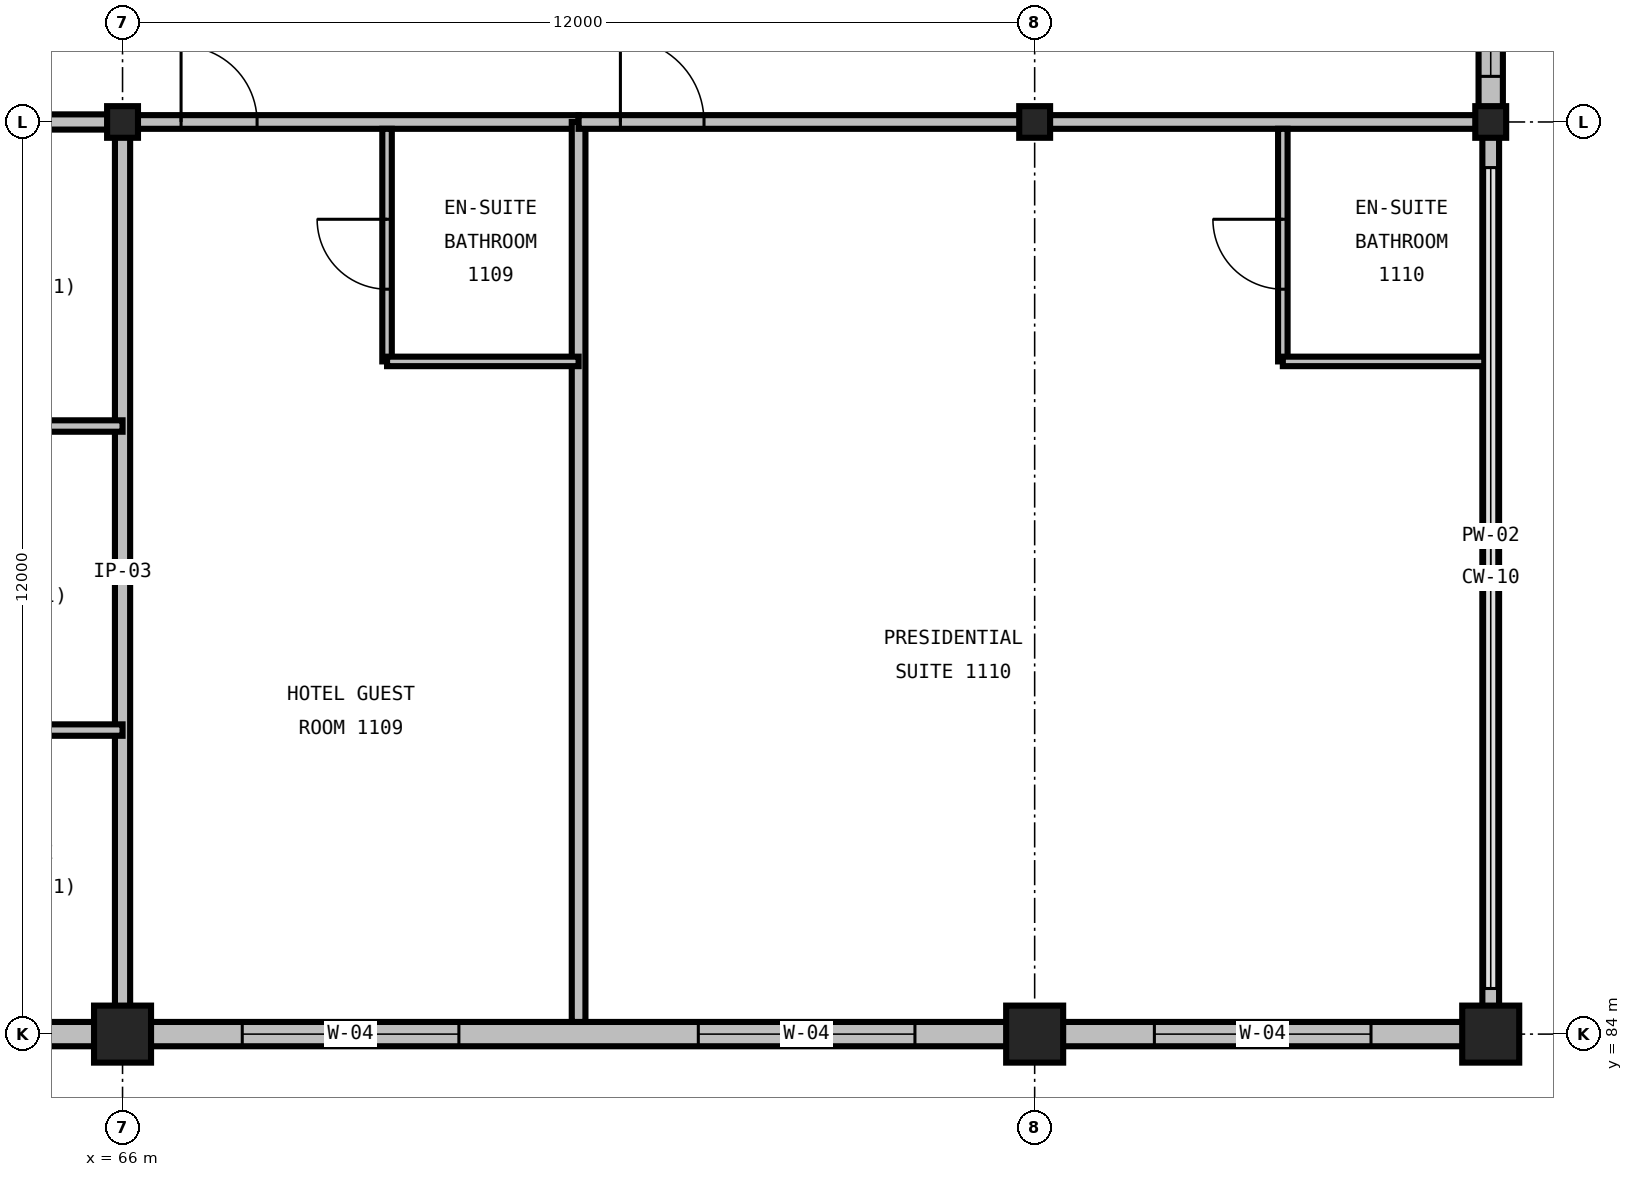
"""IFC4 building model, lengths in metres.
Left out: names, types, materials, properties, quantities, classifications, styles, units other than length and angle.
Written with IfcOpenShell. Run it as: python <this file> out.ifc"""

import sys

from ifc_helpers import new_model, si_unit, direction, frame, frame_2d, origin, origin_2d, place, context, subcontext, project, spatial, rectangle, i_section, extrude, element, fill, save


model = new_model("IFC4")
c1 = context("Model", 3, precision=1e-05, world=origin(), true_north=direction((0.0, 1.0)))
c2 = subcontext(c1, "Body", "Model", "MODEL_VIEW")
j1 = project(units=[si_unit("LENGTHUNIT", "METRE"), si_unit("PLANEANGLEUNIT", "RADIAN")], contexts=[c1])
p1 = place(None, origin())
s1 = spatial("IfcSite", under=j1, at=p1, CompositionType="ELEMENT")
p2 = place(p1, origin())
s2 = spatial("IfcBuilding", under=s1, at=p2, CompositionType="ELEMENT")
p3 = place(p2, frame((0.0, 0.0, 49.2)))
s3 = spatial("IfcBuildingStorey", under=s2, at=p3, CompositionType="ELEMENT", Elevation=49.2)
p4 = place(p3, frame((66.0, 84.0, 0.0), z_axis=(0.0, 0.0, 1.0), x_axis=(1.0, 0.0, 0.0)))
e1 = element("IfcColumn", 1, at=p4, inside=s3, PredefinedType="COLUMN", context=c2, shape_type="SweptSolid", body=[
    extrude(rectangle(XDim=0.75, YDim=0.75, at=origin_2d()), origin(), (0.0, 0.0, 1.0), 3.6),
])
p5 = place(p3, frame((66.0, 96.0, 0.0), z_axis=(0.0, 0.0, 1.0), x_axis=(1.0, 0.0, 0.0)))
e2 = element("IfcColumn", 2, at=p5, inside=s3, PredefinedType="COLUMN", context=c2, shape_type="SweptSolid", body=[
    extrude(i_section(OverallWidth=0.406, OverallDepth=0.416, WebThickness=0.03, FlangeThickness=0.048, FilletRadius=0.031, at=origin_2d()), origin(), (0.0, 0.0, 1.0), 3.6),
])
p6 = place(p3, frame((78.0, 84.0, 0.0), z_axis=(0.0, 0.0, 1.0), x_axis=(1.0, 0.0, 0.0)))
e3 = element("IfcColumn", 3, at=p6, inside=s3, PredefinedType="COLUMN", context=c2, shape_type="SweptSolid", body=[
    extrude(rectangle(XDim=0.75, YDim=0.75, at=origin_2d()), origin(), (0.0, 0.0, 1.0), 3.6),
])
p7 = place(p3, frame((78.0, 96.0, 0.0), z_axis=(0.0, 0.0, 1.0), x_axis=(1.0, 0.0, 0.0)))
e4 = element("IfcColumn", 4, at=p7, inside=s3, PredefinedType="COLUMN", context=c2, shape_type="SweptSolid", body=[
    extrude(i_section(OverallWidth=0.406, OverallDepth=0.416, WebThickness=0.03, FlangeThickness=0.048, FilletRadius=0.031, at=origin_2d()), origin(), (0.0, 0.0, 1.0), 3.6),
])
p8 = place(p3, frame((84.0, 84.0, 0.0), z_axis=(0.0, 0.0, 1.0), x_axis=(1.0, 0.0, 0.0)))
e5 = element("IfcColumn", 5, at=p8, inside=s3, PredefinedType="COLUMN", context=c2, shape_type="SweptSolid", body=[
    extrude(rectangle(XDim=0.75, YDim=0.75, at=origin_2d()), origin(), (0.0, 0.0, 1.0), 3.6),
])
p9 = place(p3, frame((84.0, 96.0, 0.0), z_axis=(0.0, 0.0, 1.0), x_axis=(1.0, 0.0, 0.0)))
e6 = element("IfcColumn", 6, at=p9, inside=s3, PredefinedType="COLUMN", context=c2, shape_type="SweptSolid", body=[
    extrude(i_section(OverallWidth=0.406, OverallDepth=0.416, WebThickness=0.03, FlangeThickness=0.048, FilletRadius=0.031, at=origin_2d()), origin(), (0.0, 0.0, 1.0), 3.6),
])
p10 = place(p3, frame((54.0, 84.0, 0.0), z_axis=(0.0, 0.0, 1.0), x_axis=(1.0, 0.0, 0.0)))
e7 = element("IfcWall", 7, at=p10, inside=s3, PredefinedType="STANDARD", context=c2, shape_type="SweptSolid", body=[
    extrude(rectangle(XDim=12.0, YDim=0.32, at=frame_2d((6.0, 0.0))), origin(), (0.0, 0.0, 1.0), 2.536),
])
p11 = place(p10, frame((2.3, 0.0, 1.0)))
e8 = element("IfcOpeningElement", 8, at=p11, cuts=e7, PredefinedType="OPENING", context=c2, shape_type="SweptSolid", body=[
    extrude(rectangle(XDim=1.4, YDim=1.4, at=frame_2d((0.7, 0.7))), frame((0.0, 0.175, 0.0), z_axis=(0.0, -1.0, 0.0), x_axis=(1.0, 0.0, 0.0)), (0.0, 0.0, 1.0), 0.35),
])
p12 = place(p10, frame((8.25, 0.0, 1.0)))
e9 = element("IfcOpeningElement", 9, at=p12, cuts=e7, PredefinedType="OPENING", context=c2, shape_type="SweptSolid", body=[
    extrude(rectangle(XDim=1.5, YDim=1.35, at=frame_2d((0.75, 0.675))), frame((0.0, 0.175, 0.0), z_axis=(0.0, -1.0, 0.0), x_axis=(1.0, 0.0, 0.0)), (0.0, 0.0, 1.0), 0.35),
])
p13 = place(p3, frame((66.0, 84.0, 0.0), z_axis=(0.0, 0.0, 1.0), x_axis=(1.0, 0.0, 0.0)))
e10 = element("IfcWall", 10, at=p13, inside=s3, PredefinedType="STANDARD", context=c2, shape_type="SweptSolid", body=[
    extrude(rectangle(XDim=12.0, YDim=0.32, at=frame_2d((6.0, 0.0))), origin(), (0.0, 0.0, 1.0), 2.536),
])
p14 = place(p13, frame((1.575, 0.0, 0.7)))
e11 = element("IfcOpeningElement", 11, at=p14, cuts=e10, PredefinedType="OPENING", context=c2, shape_type="SweptSolid", body=[
    extrude(rectangle(XDim=2.85, YDim=1.65, at=frame_2d((1.425, 0.825))), frame((0.0, 0.175, 0.0), z_axis=(0.0, -1.0, 0.0), x_axis=(1.0, 0.0, 0.0)), (0.0, 0.0, 1.0), 0.35),
])
p15 = place(p13, frame((7.575, 0.0, 0.7)))
e12 = element("IfcOpeningElement", 12, at=p15, cuts=e10, PredefinedType="OPENING", context=c2, shape_type="SweptSolid", body=[
    extrude(rectangle(XDim=2.85, YDim=1.65, at=frame_2d((1.425, 0.825))), frame((0.0, 0.175, 0.0), z_axis=(0.0, -1.0, 0.0), x_axis=(1.0, 0.0, 0.0)), (0.0, 0.0, 1.0), 0.35),
])
p16 = place(p3, frame((78.0, 84.0, 0.0), z_axis=(0.0, 0.0, 1.0), x_axis=(1.0, 0.0, 0.0)))
e13 = element("IfcWall", 13, at=p16, inside=s3, PredefinedType="STANDARD", context=c2, shape_type="SweptSolid", body=[
    extrude(rectangle(XDim=6.0, YDim=0.32, at=frame_2d((3.0, 0.0))), origin(), (0.0, 0.0, 1.0), 2.536),
])
p17 = place(p16, frame((1.575, 0.0, 0.7)))
e14 = element("IfcOpeningElement", 14, at=p17, cuts=e13, PredefinedType="OPENING", context=c2, shape_type="SweptSolid", body=[
    extrude(rectangle(XDim=2.85, YDim=1.65, at=frame_2d((1.425, 0.825))), frame((0.0, 0.175, 0.0), z_axis=(0.0, -1.0, 0.0), x_axis=(1.0, 0.0, 0.0)), (0.0, 0.0, 1.0), 0.35),
])
p18 = place(p3, frame((84.0, 84.0, 0.0), z_axis=(0.0, 0.0, 1.0), x_axis=(0.0, 1.0, 0.0)))
e15 = element("IfcWall", 15, at=p18, inside=s3, PredefinedType="PARAPET", context=c2, shape_type="SweptSolid", body=[
    extrude(rectangle(XDim=12.0, YDim=0.22, at=frame_2d((6.0, 0.0))), origin(), (0.0, 0.0, 1.0), 0.2),
])
p19 = place(p3, frame((84.0, 96.0, 0.0), z_axis=(0.0, 0.0, 1.0), x_axis=(0.0, 1.0, 0.0)))
e16 = element("IfcWall", 16, at=p19, inside=s3, PredefinedType="STANDARD", context=c2, shape_type="SweptSolid", body=[
    extrude(rectangle(XDim=9.0, YDim=0.32, at=frame_2d((4.5, 0.0))), origin(), (0.0, 0.0, 1.0), 2.981),
])
p20 = place(p19, frame((0.6, 0.0, 0.85)))
e17 = element("IfcOpeningElement", 17, at=p20, cuts=e16, PredefinedType="OPENING", context=c2, shape_type="SweptSolid", body=[
    extrude(rectangle(XDim=1.8, YDim=1.5, at=frame_2d((0.9, 0.75))), frame((0.0, 0.175, 0.0), z_axis=(0.0, -1.0, 0.0), x_axis=(1.0, 0.0, 0.0)), (0.0, 0.0, 1.0), 0.35),
])
p21 = place(p3, frame((66.0, 84.16, 0.0), z_axis=(0.0, 0.0, 1.0), x_axis=(0.0, 1.0, 0.0)))
e18 = element("IfcWall", 18, at=p21, inside=s3, PredefinedType="PARTITIONING", context=c2, shape_type="SweptSolid", body=[
    extrude(rectangle(XDim=11.84, YDim=0.2, at=frame_2d((5.92, 0.0))), origin(), (0.0, 0.0, 1.0), 2.59),
])
p22 = place(p3, frame((60.8, 96.0, 0.0), z_axis=(0.0, 0.0, 1.0), x_axis=(1.0, 0.0, 0.0)))
e19 = element("IfcWall", 19, at=p22, inside=s3, PredefinedType="PARTITIONING", context=c2, shape_type="SweptSolid", body=[
    extrude(rectangle(XDim=5.2, YDim=0.2, at=frame_2d((2.6, 0.0))), origin(), (0.0, 0.0, 1.0), 2.359),
])
for number, where, z_axis, x_axis in (
    (20, (60.8, 88.0, 0.0), (0.0, 0.0, 1.0), (1.0, 0.0, 0.0)),
    (21, (60.8, 92.0, 0.0), (0.0, 0.0, 1.0), (1.0, 0.0, 0.0)),
):
    element("IfcWall", number, at=place(p3, frame(where, z_axis=z_axis, x_axis=x_axis)), inside=s3, PredefinedType="PARTITIONING", context=c2, shape_type="SweptSolid", body=[
        extrude(rectangle(XDim=5.2, YDim=0.15, at=frame_2d((2.6, 0.0))), origin(), (0.0, 0.0, 1.0), 3.29),
    ])
p23 = place(p3, frame((66.0, 96.0, 0.0), z_axis=(0.0, 0.0, 1.0), x_axis=(1.0, 0.0, 0.0)))
e22 = element("IfcWall", 22, at=p23, inside=s3, PredefinedType="PARTITIONING", context=c2, shape_type="SweptSolid", body=[
    extrude(rectangle(XDim=6.0, YDim=0.18, at=frame_2d((3.0, 0.0))), origin(), (0.0, 0.0, 1.0), 2.664),
])
p24 = place(p23, frame((0.77, 0.0, 0.0)))
e23 = element("IfcOpeningElement", 23, at=p24, cuts=e22, PredefinedType="OPENING", context=c2, shape_type="SweptSolid", body=[
    extrude(rectangle(XDim=1.0, YDim=2.15, at=frame_2d((0.5, 1.075))), frame((0.0, 0.105, 0.0), z_axis=(0.0, -1.0, 0.0), x_axis=(1.0, 0.0, 0.0)), (0.0, 0.0, 1.0), 0.21),
])
p25 = place(p3, frame((72.0, 84.16, 0.0), z_axis=(0.0, 0.0, 1.0), x_axis=(0.0, 1.0, 0.0)))
e24 = element("IfcWall", 24, at=p25, inside=s3, PredefinedType="PARTITIONING", context=c2, shape_type="SweptSolid", body=[
    extrude(rectangle(XDim=11.84, YDim=0.18, at=frame_2d((5.92, 0.0))), origin(), (0.0, 0.0, 1.0), 3.29),
])
p26 = place(p3, frame((69.48, 92.85, 0.0), z_axis=(0.0, 0.0, 1.0), x_axis=(0.0, 1.0, 0.0)))
e25 = element("IfcWall", 25, at=p26, inside=s3, PredefinedType="PARTITIONING", context=c2, shape_type="SweptSolid", body=[
    extrude(rectangle(XDim=3.06, YDim=0.125, at=frame_2d((1.53, 0.0))), origin(), (0.0, 0.0, 1.0), 3.29),
])
p27 = place(p26, frame((0.95, 0.0, 0.0)))
e26 = element("IfcOpeningElement", 26, at=p27, cuts=e25, PredefinedType="OPENING", context=c2, shape_type="SweptSolid", body=[
    extrude(rectangle(XDim=0.92, YDim=2.1, at=frame_2d((0.46, 1.05))), frame((0.0, 0.077, 0.0), z_axis=(0.0, -1.0, 0.0), x_axis=(1.0, 0.0, 0.0)), (0.0, 0.0, 1.0), 0.155),
])
p28 = place(p3, frame((69.48, 92.85, 0.0), z_axis=(0.0, 0.0, 1.0), x_axis=(1.0, 0.0, 0.0)))
e27 = element("IfcWall", 27, at=p28, inside=s3, PredefinedType="PARTITIONING", context=c2, shape_type="SweptSolid", body=[
    extrude(rectangle(XDim=2.52, YDim=0.125, at=frame_2d((1.26, 0.0))), origin(), (0.0, 0.0, 1.0), 3.29),
])
p29 = place(p3, frame((72.0, 96.0, 0.0), z_axis=(0.0, 0.0, 1.0), x_axis=(1.0, 0.0, 0.0)))
e28 = element("IfcWall", 28, at=p29, inside=s3, PredefinedType="PARTITIONING", context=c2, shape_type="SweptSolid", body=[
    extrude(rectangle(XDim=11.915, YDim=0.18, at=frame_2d((5.957, 0.0))), origin(), (0.0, 0.0, 1.0), 2.664),
])
p30 = place(p29, frame((0.55, 0.0, 0.0)))
e29 = element("IfcOpeningElement", 29, at=p30, cuts=e28, PredefinedType="OPENING", context=c2, shape_type="SweptSolid", body=[
    extrude(rectangle(XDim=1.1, YDim=2.2, at=frame_2d((0.55, 1.1))), frame((0.0, 0.105, 0.0), z_axis=(0.0, -1.0, 0.0), x_axis=(1.0, 0.0, 0.0)), (0.0, 0.0, 1.0), 0.21),
])
p31 = place(p3, frame((81.265, 92.85, 0.0), z_axis=(0.0, 0.0, 1.0), x_axis=(0.0, 1.0, 0.0)))
e30 = element("IfcWall", 30, at=p31, inside=s3, PredefinedType="PARTITIONING", context=c2, shape_type="SweptSolid", body=[
    extrude(rectangle(XDim=3.06, YDim=0.125, at=frame_2d((1.53, 0.0))), origin(), (0.0, 0.0, 1.0), 3.29),
])
p32 = place(p31, frame((0.95, 0.0, 0.0)))
e31 = element("IfcOpeningElement", 31, at=p32, cuts=e30, PredefinedType="OPENING", context=c2, shape_type="SweptSolid", body=[
    extrude(rectangle(XDim=0.92, YDim=2.1, at=frame_2d((0.46, 1.05))), frame((0.0, 0.077, 0.0), z_axis=(0.0, -1.0, 0.0), x_axis=(1.0, 0.0, 0.0)), (0.0, 0.0, 1.0), 0.155),
])
p33 = place(p3, frame((81.265, 92.85, 0.0), z_axis=(0.0, 0.0, 1.0), x_axis=(1.0, 0.0, 0.0)))
e32 = element("IfcWall", 32, at=p33, inside=s3, PredefinedType="PARTITIONING", context=c2, shape_type="SweptSolid", body=[
    extrude(rectangle(XDim=2.65, YDim=0.125, at=frame_2d((1.325, 0.0))), origin(), (0.0, 0.0, 1.0), 3.29),
])
p34 = place(p14, origin())
e33 = element("IfcWindow", 33, at=p34, inside=s3, PartitioningType="TRIPLE_PANEL_VERTICAL", PredefinedType="WINDOW", context=c2, shape_type="SweptSolid", body=[
    extrude(rectangle(XDim=2.85, YDim=1.65, at=frame_2d((1.425, 0.825))), frame((0.0, 0.03, 0.0), z_axis=(0.0, -1.0, 0.0), x_axis=(1.0, 0.0, 0.0)), (0.0, 0.0, 1.0), 0.06),
])
fill(e11, e33)
p35 = place(p15, origin())
e34 = element("IfcWindow", 34, at=p35, inside=s3, PartitioningType="TRIPLE_PANEL_VERTICAL", PredefinedType="WINDOW", context=c2, shape_type="SweptSolid", body=[
    extrude(rectangle(XDim=2.85, YDim=1.65, at=frame_2d((1.425, 0.825))), frame((0.0, 0.03, 0.0), z_axis=(0.0, -1.0, 0.0), x_axis=(1.0, 0.0, 0.0)), (0.0, 0.0, 1.0), 0.06),
])
fill(e12, e34)
p36 = place(p17, origin())
e35 = element("IfcWindow", 35, at=p36, inside=s3, PartitioningType="TRIPLE_PANEL_VERTICAL", PredefinedType="WINDOW", context=c2, shape_type="SweptSolid", body=[
    extrude(rectangle(XDim=2.85, YDim=1.65, at=frame_2d((1.425, 0.825))), frame((0.0, 0.03, 0.0), z_axis=(0.0, -1.0, 0.0), x_axis=(1.0, 0.0, 0.0)), (0.0, 0.0, 1.0), 0.06),
])
fill(e14, e35)
p37 = place(p20, origin())
e36 = element("IfcWindow", 36, at=p37, inside=s3, PartitioningType="SINGLE_PANEL", PredefinedType="WINDOW", context=c2, shape_type="SweptSolid", body=[
    extrude(rectangle(XDim=1.8, YDim=1.5, at=frame_2d((0.9, 0.75))), frame((0.0, 0.03, 0.0), z_axis=(0.0, -1.0, 0.0), x_axis=(1.0, 0.0, 0.0)), (0.0, 0.0, 1.0), 0.06),
])
fill(e17, e36)
p38 = place(p24, origin())
e37 = element("IfcDoor", 37, at=p38, inside=s3, OperationType="SINGLE_SWING_LEFT", PredefinedType="DOOR", context=c2, shape_type="SweptSolid", body=[
    extrude(rectangle(XDim=1.0, YDim=2.15, at=frame_2d((0.5, 1.075))), frame((0.0, 0.025, 0.0), z_axis=(0.0, -1.0, 0.0), x_axis=(1.0, 0.0, 0.0)), (0.0, 0.0, 1.0), 0.05),
])
fill(e23, e37)
p39 = place(p27, origin())
e38 = element("IfcDoor", 38, at=p39, inside=s3, OperationType="SINGLE_SWING_RIGHT", PredefinedType="DOOR", context=c2, shape_type="SweptSolid", body=[
    extrude(rectangle(XDim=0.92, YDim=2.1, at=frame_2d((0.46, 1.05))), frame((0.0, 0.025, 0.0), z_axis=(0.0, -1.0, 0.0), x_axis=(1.0, 0.0, 0.0)), (0.0, 0.0, 1.0), 0.05),
])
fill(e26, e38)
p40 = place(p30, origin())
e39 = element("IfcDoor", 39, at=p40, inside=s3, OperationType="SINGLE_SWING_LEFT", PredefinedType="DOOR", context=c2, shape_type="SweptSolid", body=[
    extrude(rectangle(XDim=1.1, YDim=2.2, at=frame_2d((0.55, 1.1))), frame((0.0, 0.025, 0.0), z_axis=(0.0, -1.0, 0.0), x_axis=(1.0, 0.0, 0.0)), (0.0, 0.0, 1.0), 0.05),
])
fill(e29, e39)
p41 = place(p32, origin())
e40 = element("IfcDoor", 40, at=p41, inside=s3, OperationType="SINGLE_SWING_RIGHT", PredefinedType="DOOR", context=c2, shape_type="SweptSolid", body=[
    extrude(rectangle(XDim=0.92, YDim=2.1, at=frame_2d((0.46, 1.05))), frame((0.0, 0.025, 0.0), z_axis=(0.0, -1.0, 0.0), x_axis=(1.0, 0.0, 0.0)), (0.0, 0.0, 1.0), 0.05),
])
fill(e31, e40)
save(model, sys.argv[1])
